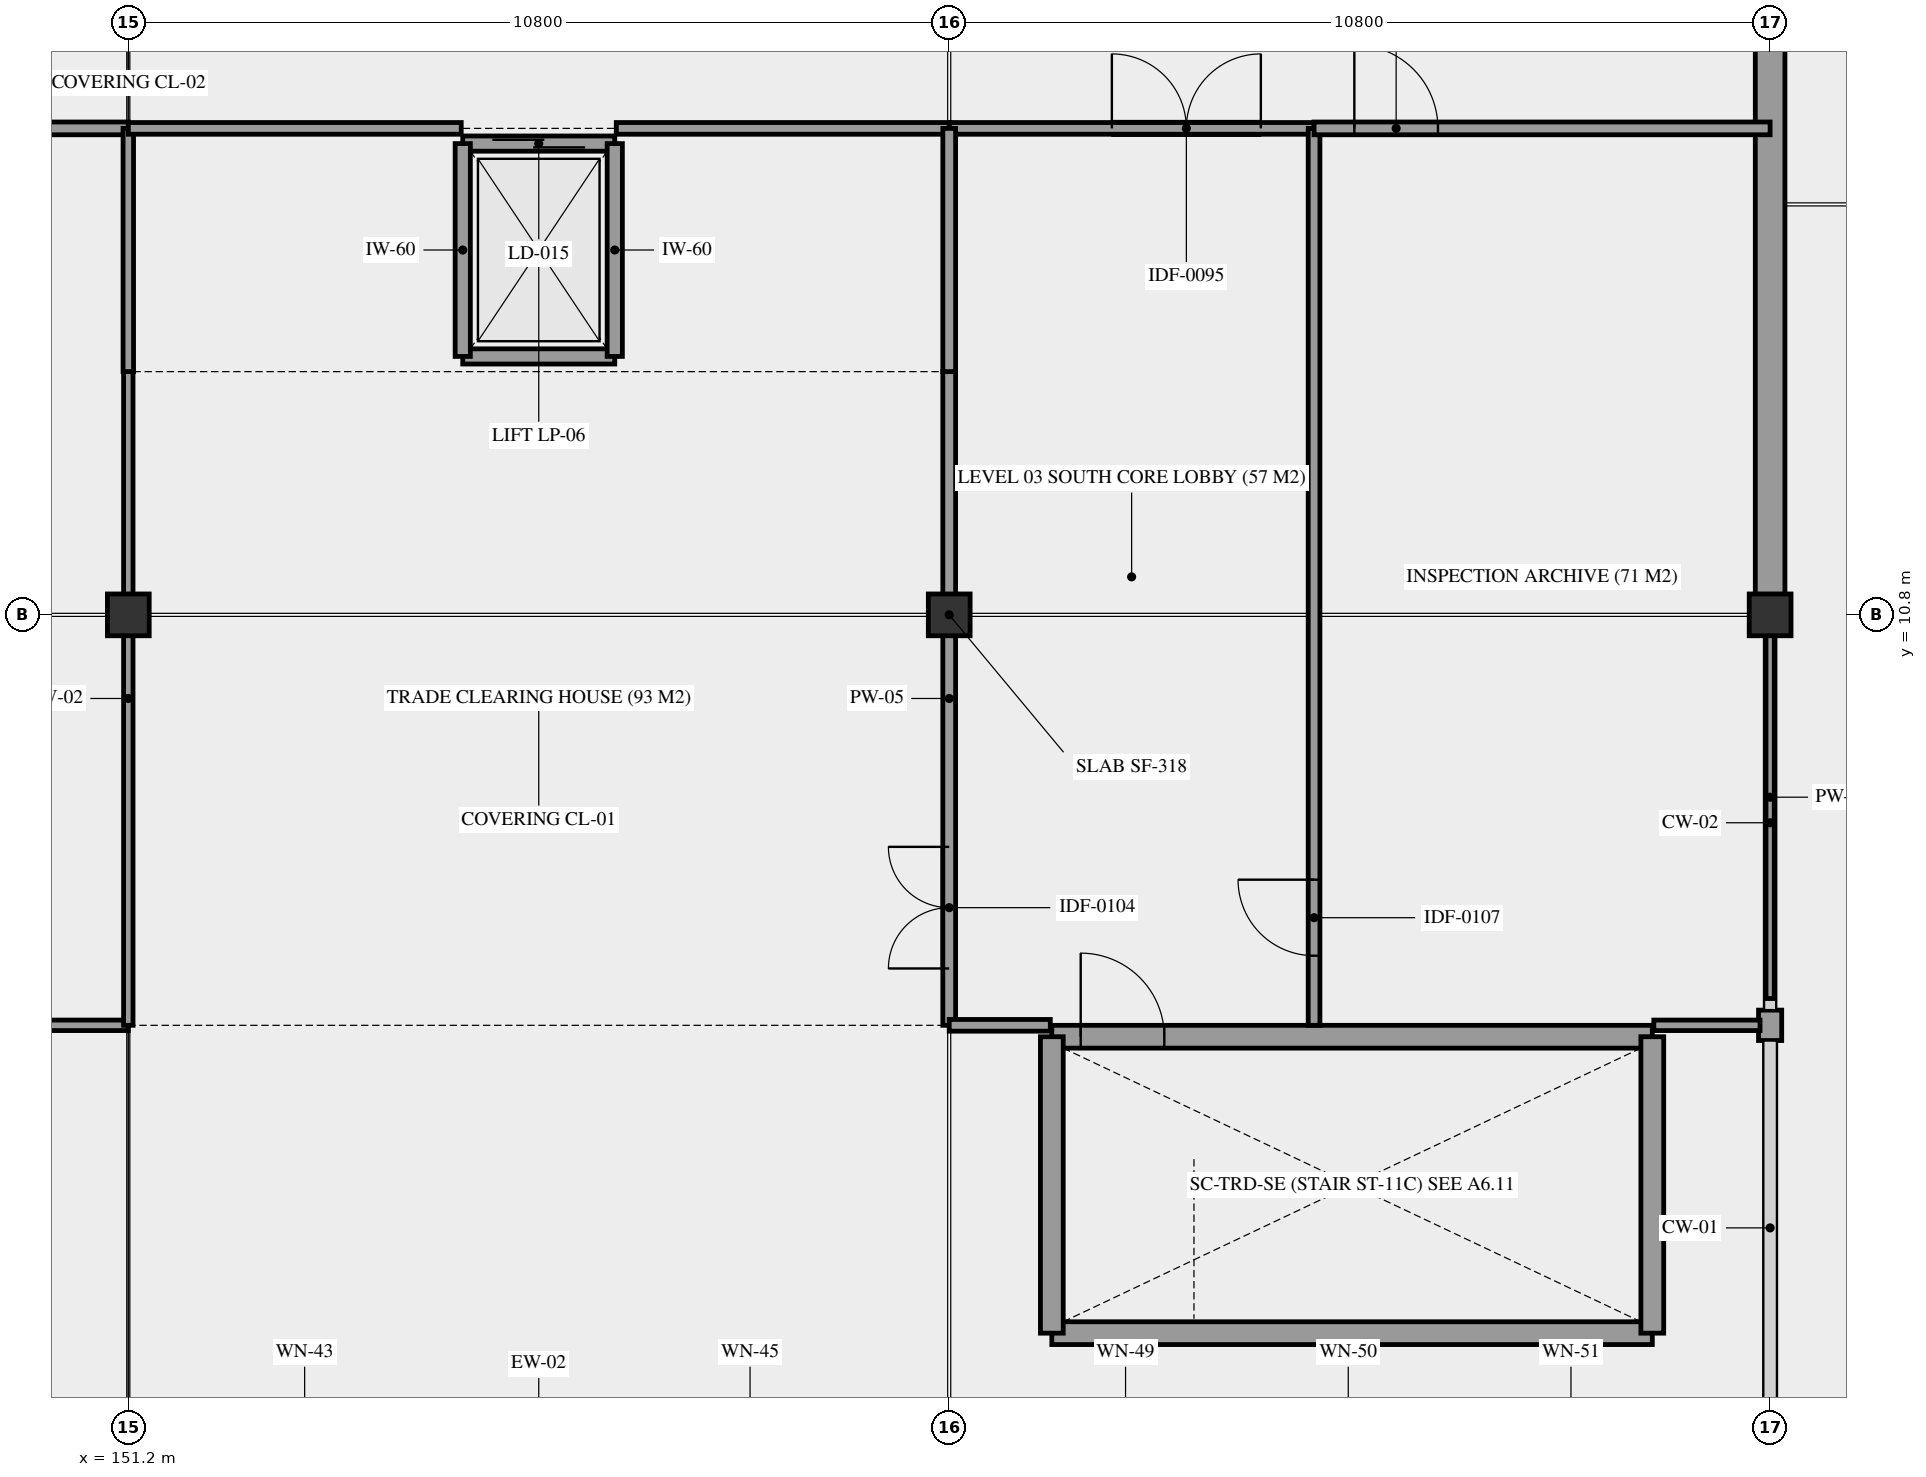
"""IFC4 building model, lengths in metres.
Left out: names, types, materials, properties, quantities, classifications, styles, units other than length and angle.
Written with IfcOpenShell. Run it as: python <this file> out.ifc"""

import sys

from ifc_helpers import new_model, si_unit, direction, frame, frame_2d, origin, origin_2d, place, context, subcontext, project, spatial, rectangle, extrude, element, fill, save


model = new_model("IFC4")
c1 = context("Model", 3, precision=1e-05, world=origin(), true_north=direction((0.0, 1.0)))
c2 = subcontext(c1, "Body", "Model", "MODEL_VIEW")
j1 = project(units=[si_unit("LENGTHUNIT", "METRE"), si_unit("PLANEANGLEUNIT", "RADIAN")], contexts=[c1])
p1 = place(None, origin())
s1 = spatial("IfcSite", under=j1, at=p1, CompositionType="ELEMENT")
p2 = place(p1, origin())
s2 = spatial("IfcBuilding", under=s1, at=p2, CompositionType="ELEMENT")
p3 = place(p2, frame((0.0, 0.0, 14.76)))
s3 = spatial("IfcBuildingStorey", under=s2, at=p3, CompositionType="ELEMENT", Elevation=14.76)
for number, where, z_axis, x_axis in (
    (1, (151.2, 10.8, 0.0), (0.0, 0.0, 1.0), (1.0, 0.0, 0.0)),
    (2, (162.0, 10.8, 0.0), (0.0, 0.0, 1.0), (1.0, 0.0, 0.0)),
    (3, (172.8, 10.8, 0.0), (0.0, 0.0, 1.0), (1.0, 0.0, 0.0)),
):
    element("IfcColumn", number, at=place(p3, frame(where, z_axis=z_axis, x_axis=x_axis)), inside=s3, PredefinedType="COLUMN", context=c2, shape_type="SweptSolid", body=[
        extrude(rectangle(XDim=0.55, YDim=0.55, at=origin_2d()), origin(), (0.0, 0.0, 1.0), 4.32),
    ])
p4 = place(p3, frame((172.8, 5.2, 0.0), z_axis=(0.0, 0.0, 1.0), x_axis=(0.0, 1.0, 0.0)))
e4 = element("IfcWall", 4, at=p4, inside=s3, PredefinedType="STANDARD", context=c2, shape_type="SweptSolid", body=[
    extrude(rectangle(XDim=0.4, YDim=0.305, at=frame_2d((0.2, 0.0))), origin(), (0.0, 0.0, 1.0), 3.17),
])
p5 = place(p3, frame((172.8, 11.07, 0.0), z_axis=(0.0, 0.0, 1.0), x_axis=(0.0, 1.0, 0.0)))
e5 = element("IfcWall", 5, at=p5, inside=s3, PredefinedType="STANDARD", context=c2, shape_type="SweptSolid", body=[
    extrude(rectangle(XDim=10.26, YDim=0.39, at=frame_2d((5.13, 0.0))), origin(), (0.0, 0.0, 1.0), 3.17),
])
p6 = place(p3, frame((163.35, 1.35, 0.0), z_axis=(0.0, 0.0, 1.0), x_axis=(1.0, 0.0, 0.0)))
e6 = element("IfcWall", 6, at=p6, inside=s3, PredefinedType="SHEAR", context=c2, shape_type="SweptSolid", body=[
    extrude(rectangle(XDim=7.9, YDim=0.3, at=frame_2d((3.95, 0.0))), origin(), (0.0, 0.0, 1.0), 4.32),
])
p7 = place(p3, frame((163.35, 5.25, 0.0), z_axis=(0.0, 0.0, 1.0), x_axis=(1.0, 0.0, 0.0)))
e7 = element("IfcWall", 7, at=p7, inside=s3, PredefinedType="SHEAR", context=c2, shape_type="SweptSolid", body=[
    extrude(rectangle(XDim=7.9, YDim=0.3, at=frame_2d((3.95, 0.0))), origin(), (0.0, 0.0, 1.0), 4.32),
])
p8 = place(p7, frame((0.38, 0.0, 0.0)))
e8 = element("IfcOpeningElement", 8, at=p8, cuts=e7, PredefinedType="OPENING", context=c2, shape_type="SweptSolid", body=[
    extrude(rectangle(XDim=1.1, YDim=2.2, at=frame_2d((0.55, 1.1))), frame((0.0, 0.16, 0.0), z_axis=(0.0, -1.0, 0.0), x_axis=(1.0, 0.0, 0.0)), (0.0, 0.0, 1.0), 0.32),
])
for number, where, z_axis, x_axis in (
    (9, (163.35, 1.35, 0.0), (0.0, 0.0, 1.0), (0.0, 1.0, 0.0)),
    (10, (171.25, 1.35, 0.0), (0.0, 0.0, 1.0), (0.0, 1.0, 0.0)),
):
    element("IfcWall", number, at=place(p3, frame(where, z_axis=z_axis, x_axis=x_axis)), inside=s3, PredefinedType="SHEAR", context=c2, shape_type="SweptSolid", body=[
        extrude(rectangle(XDim=3.9, YDim=0.3, at=frame_2d((1.95, 0.0))), origin(), (0.0, 0.0, 1.0), 4.32),
    ])
p9 = place(p3, frame((155.6, 14.2, 0.0), z_axis=(0.0, 0.0, 1.0), x_axis=(1.0, 0.0, 0.0)))
e11 = element("IfcWall", 11, at=p9, inside=s3, PredefinedType="SOLIDWALL", context=c2, shape_type="SweptSolid", body=[
    extrude(rectangle(XDim=2.0, YDim=0.2, at=frame_2d((1.0, 0.0))), origin(), (0.0, 0.0, 1.0), 3.14),
])
p10 = place(p3, frame((155.6, 17.0, 0.0), z_axis=(0.0, 0.0, 1.0), x_axis=(1.0, 0.0, 0.0)))
e12 = element("IfcWall", 12, at=p10, inside=s3, PredefinedType="SOLIDWALL", context=c2, shape_type="SweptSolid", body=[
    extrude(rectangle(XDim=2.0, YDim=0.2, at=frame_2d((1.0, 0.0))), origin(), (0.0, 0.0, 1.0), 3.14),
])
p11 = place(p10, frame((0.39, 0.0, 0.0)))
e13 = element("IfcOpeningElement", 13, at=p11, cuts=e12, PredefinedType="OPENING", context=c2, shape_type="SweptSolid", body=[
    extrude(rectangle(XDim=1.22, YDim=2.2, at=frame_2d((0.61, 1.1))), frame((0.0, 0.11, 0.0), z_axis=(0.0, -1.0, 0.0), x_axis=(1.0, 0.0, 0.0)), (0.0, 0.0, 1.0), 0.22),
])
for number, where, z_axis, x_axis in (
    (14, (155.6, 14.2, 0.0), (0.0, 0.0, 1.0), (0.0, 1.0, 0.0)),
    (15, (157.6, 14.2, 0.0), (0.0, 0.0, 1.0), (0.0, 1.0, 0.0)),
):
    element("IfcWall", number, at=place(p3, frame(where, z_axis=z_axis, x_axis=x_axis)), inside=s3, PredefinedType="SOLIDWALL", context=c2, shape_type="SweptSolid", body=[
        extrude(rectangle(XDim=2.8, YDim=0.2, at=frame_2d((1.4, 0.0))), origin(), (0.0, 0.0, 1.0), 3.14),
    ])
p12 = place(p3, frame((162.0, 17.2, 0.0), z_axis=(0.0, 0.0, 1.0), x_axis=(1.0, 0.0, 0.0)))
e16 = element("IfcWall", 16, at=p12, inside=s3, PredefinedType="PARTITIONING", context=c2, shape_type="SweptSolid", body=[
    extrude(rectangle(XDim=4.8, YDim=0.154, at=frame_2d((2.4, 0.0))), origin(), (0.0, 0.0, 1.0), 2.87),
])
p13 = place(p12, frame((2.14, 0.0, 0.0)))
e17 = element("IfcOpeningElement", 17, at=p13, cuts=e16, PredefinedType="OPENING", context=c2, shape_type="SweptSolid", body=[
    extrude(rectangle(XDim=1.96, YDim=2.3, at=frame_2d((0.98, 1.15))), frame((0.0, 0.087, 0.0), z_axis=(0.0, -1.0, 0.0), x_axis=(1.0, 0.0, 0.0)), (0.0, 0.0, 1.0), 0.174),
])
p14 = place(p3, frame((140.4, 17.2, 0.0), z_axis=(0.0, 0.0, 1.0), x_axis=(1.0, 0.0, 0.0)))
e18 = element("IfcWall", 18, at=p14, inside=s3, PredefinedType="PARTITIONING", context=c2, shape_type="SweptSolid", body=[
    extrude(rectangle(XDim=10.8, YDim=0.168, at=frame_2d((5.4, 0.0))), origin(), (0.0, 0.0, 1.0), 2.87),
])
p15 = place(p14, frame((2.15, 0.0, 0.0)))
e19 = element("IfcOpeningElement", 19, at=p15, cuts=e18, PredefinedType="OPENING", context=c2, shape_type="SweptSolid", body=[
    extrude(rectangle(XDim=1.1, YDim=2.2, at=frame_2d((0.55, 1.1))), frame((0.0, 0.094, 0.0), z_axis=(0.0, -1.0, 0.0), x_axis=(1.0, 0.0, 0.0)), (0.0, 0.0, 1.0), 0.188),
])
p16 = place(p3, frame((162.0, 5.4, 0.0), z_axis=(0.0, 0.0, 1.0), x_axis=(0.0, 1.0, 0.0)))
e20 = element("IfcWall", 20, at=p16, inside=s3, PredefinedType="PARTITIONING", context=c2, shape_type="SweptSolid", body=[
    extrude(rectangle(XDim=8.6, YDim=0.168, at=frame_2d((4.3, 0.0))), origin(), (0.0, 0.0, 1.0), 2.87),
])
p17 = place(p16, frame((0.748, 0.0, 0.0)))
e21 = element("IfcOpeningElement", 21, at=p17, cuts=e20, PredefinedType="OPENING", context=c2, shape_type="SweptSolid", body=[
    extrude(rectangle(XDim=1.6, YDim=2.2, at=frame_2d((0.8, 1.1))), frame((0.0, 0.094, 0.0), z_axis=(0.0, -1.0, 0.0), x_axis=(1.0, 0.0, 0.0)), (0.0, 0.0, 1.0), 0.188),
])
p18 = place(p3, frame((166.8, 5.4, 0.0), z_axis=(0.0, 0.0, 1.0), x_axis=(0.0, 1.0, 0.0)))
e22 = element("IfcWall", 22, at=p18, inside=s3, PredefinedType="PARTITIONING", context=c2, shape_type="SweptSolid", body=[
    extrude(rectangle(XDim=11.8, YDim=0.154, at=frame_2d((5.9, 0.0))), origin(), (0.0, 0.0, 1.0), 2.87),
])
p19 = place(p18, frame((0.916, 0.0, 0.0)))
e23 = element("IfcOpeningElement", 23, at=p19, cuts=e22, PredefinedType="OPENING", context=c2, shape_type="SweptSolid", body=[
    extrude(rectangle(XDim=1.0, YDim=2.15, at=frame_2d((0.5, 1.075))), frame((0.0, 0.087, 0.0), z_axis=(0.0, -1.0, 0.0), x_axis=(1.0, 0.0, 0.0)), (0.0, 0.0, 1.0), 0.174),
])
p20 = place(p3, frame((166.8, 17.2, 0.0), z_axis=(0.0, 0.0, 1.0), x_axis=(1.0, 0.0, 0.0)))
e24 = element("IfcWall", 24, at=p20, inside=s3, PredefinedType="PARTITIONING", context=c2, shape_type="SweptSolid", body=[
    extrude(rectangle(XDim=6.0, YDim=0.168, at=frame_2d((3.0, 0.0))), origin(), (0.0, 0.0, 1.0), 2.87),
])
p21 = place(p20, frame((0.53, 0.0, 0.0)))
e25 = element("IfcOpeningElement", 25, at=p21, cuts=e24, PredefinedType="OPENING", context=c2, shape_type="SweptSolid", body=[
    extrude(rectangle(XDim=1.1, YDim=2.2, at=frame_2d((0.55, 1.1))), frame((0.0, 0.094, 0.0), z_axis=(0.0, -1.0, 0.0), x_axis=(1.0, 0.0, 0.0)), (0.0, 0.0, 1.0), 0.188),
])
p22 = place(p3, frame((149.27, 5.4, 0.0), z_axis=(0.0, 0.0, 1.0), x_axis=(1.0, 0.0, 0.0)))
e26 = element("IfcWall", 26, at=p22, inside=s3, PredefinedType="PARTITIONING", context=c2, shape_type="SweptSolid", body=[
    extrude(rectangle(XDim=1.93, YDim=0.138, at=frame_2d((0.965, 0.0))), origin(), (0.0, 0.0, 1.0), 2.87),
])
p23 = place(p3, frame((151.2, 5.4, 0.0), z_axis=(0.0, 0.0, 1.0), x_axis=(0.0, 1.0, 0.0)))
e27 = element("IfcWall", 27, at=p23, inside=s3, PredefinedType="PARTITIONING", context=c2, shape_type="SweptSolid", body=[
    extrude(rectangle(XDim=8.6, YDim=0.124, at=frame_2d((4.3, 0.0))), origin(), (0.0, 0.0, 1.0), 2.87),
])
p24 = place(p3, frame((151.2, 14.0, 0.0), z_axis=(0.0, 0.0, 1.0), x_axis=(0.0, 1.0, 0.0)))
e28 = element("IfcWall", 28, at=p24, inside=s3, PredefinedType="PARTITIONING", context=c2, shape_type="SweptSolid", body=[
    extrude(rectangle(XDim=3.2, YDim=0.138, at=frame_2d((1.6, 0.0))), origin(), (0.0, 0.0, 1.0), 2.87),
])
p25 = place(p3, frame((151.2, 17.2, 0.0), z_axis=(0.0, 0.0, 1.0), x_axis=(1.0, 0.0, 0.0)))
e29 = element("IfcWall", 29, at=p25, inside=s3, PredefinedType="PARTITIONING", context=c2, shape_type="SweptSolid", body=[
    extrude(rectangle(XDim=4.38, YDim=0.154, at=frame_2d((2.19, 0.0))), origin(), (0.0, 0.0, 1.0), 2.87),
])
p26 = place(p3, frame((157.62, 17.2, 0.0), z_axis=(0.0, 0.0, 1.0), x_axis=(1.0, 0.0, 0.0)))
e30 = element("IfcWall", 30, at=p26, inside=s3, PredefinedType="PARTITIONING", context=c2, shape_type="SweptSolid", body=[
    extrude(rectangle(XDim=4.38, YDim=0.154, at=frame_2d((2.19, 0.0))), origin(), (0.0, 0.0, 1.0), 2.87),
])
p27 = place(p3, frame((162.0, 5.4, 0.0), z_axis=(0.0, 0.0, 1.0), x_axis=(1.0, 0.0, 0.0)))
e31 = element("IfcWall", 31, at=p27, inside=s3, PredefinedType="PARTITIONING", context=c2, shape_type="SweptSolid", body=[
    extrude(rectangle(XDim=1.33, YDim=0.154, at=frame_2d((0.665, 0.0))), origin(), (0.0, 0.0, 1.0), 2.87),
])
p28 = place(p3, frame((162.0, 14.0, 0.0), z_axis=(0.0, 0.0, 1.0), x_axis=(0.0, 1.0, 0.0)))
e32 = element("IfcWall", 32, at=p28, inside=s3, PredefinedType="PARTITIONING", context=c2, shape_type="SweptSolid", body=[
    extrude(rectangle(XDim=3.2, YDim=0.168, at=frame_2d((1.6, 0.0))), origin(), (0.0, 0.0, 1.0), 2.87),
])
p29 = place(p3, frame((171.27, 5.4, 0.0), z_axis=(0.0, 0.0, 1.0), x_axis=(1.0, 0.0, 0.0)))
e33 = element("IfcWall", 33, at=p29, inside=s3, PredefinedType="PARTITIONING", context=c2, shape_type="SweptSolid", body=[
    extrude(rectangle(XDim=1.397, YDim=0.138, at=frame_2d((0.699, 0.0))), origin(), (0.0, 0.0, 1.0), 2.87),
])
p30 = place(p3, frame((172.8, 5.752, 0.0), z_axis=(0.0, 0.0, 1.0), x_axis=(0.0, 1.0, 0.0)))
e34 = element("IfcWall", 34, at=p30, inside=s3, PredefinedType="PARTITIONING", context=c2, shape_type="SweptSolid", body=[
    extrude(rectangle(XDim=5.298, YDim=0.108, at=frame_2d((2.649, 0.0))), origin(), (0.0, 0.0, 1.0), 2.87),
])
p31 = place(p8, origin())
e35 = element("IfcDoor", 35, at=p31, inside=s3, OperationType="SINGLE_SWING_LEFT", PredefinedType="DOOR", context=c2, shape_type="SweptSolid", body=[
    extrude(rectangle(XDim=1.1, YDim=2.2, at=frame_2d((0.55, 1.1))), frame((0.0, 0.025, 0.0), z_axis=(0.0, -1.0, 0.0), x_axis=(1.0, 0.0, 0.0)), (0.0, 0.0, 1.0), 0.05),
])
fill(e8, e35)
p32 = place(p11, origin())
e36 = element("IfcDoor", 36, at=p32, inside=s3, OperationType="DOUBLE_DOOR_SLIDING", PredefinedType="DOOR", context=c2, shape_type="SweptSolid", body=[
    extrude(rectangle(XDim=1.22, YDim=2.2, at=frame_2d((0.61, 1.1))), frame((0.0, 0.025, 0.0), z_axis=(0.0, -1.0, 0.0), x_axis=(1.0, 0.0, 0.0)), (0.0, 0.0, 1.0), 0.05),
])
fill(e13, e36)
p33 = place(p13, origin())
e37 = element("IfcDoor", 37, at=p33, inside=s3, OperationType="DOUBLE_DOOR_SINGLE_SWING", PredefinedType="DOOR", context=c2, shape_type="SweptSolid", body=[
    extrude(rectangle(XDim=1.96, YDim=2.3, at=frame_2d((0.98, 1.15))), frame((0.0, 0.025, 0.0), z_axis=(0.0, -1.0, 0.0), x_axis=(1.0, 0.0, 0.0)), (0.0, 0.0, 1.0), 0.05),
])
fill(e17, e37)
p34 = place(p17, origin())
e38 = element("IfcDoor", 38, at=p34, inside=s3, OperationType="DOUBLE_DOOR_SINGLE_SWING", PredefinedType="DOOR", context=c2, shape_type="SweptSolid", body=[
    extrude(rectangle(XDim=1.6, YDim=2.2, at=frame_2d((0.8, 1.1))), frame((0.0, 0.025, 0.0), z_axis=(0.0, -1.0, 0.0), x_axis=(1.0, 0.0, 0.0)), (0.0, 0.0, 1.0), 0.05),
])
fill(e21, e38)
p35 = place(p19, origin())
e39 = element("IfcDoor", 39, at=p35, inside=s3, OperationType="SINGLE_SWING_RIGHT", PredefinedType="DOOR", context=c2, shape_type="SweptSolid", body=[
    extrude(rectangle(XDim=1.0, YDim=2.15, at=frame_2d((0.5, 1.075))), frame((0.0, 0.025, 0.0), z_axis=(0.0, -1.0, 0.0), x_axis=(1.0, 0.0, 0.0)), (0.0, 0.0, 1.0), 0.05),
])
fill(e23, e39)
p36 = place(p21, frame((1.1, 0.0, 0.0), z_axis=(0.0, 0.0, 1.0), x_axis=(-1.0, 0.0, 0.0)))
e40 = element("IfcDoor", 40, at=p36, inside=s3, OperationType="SINGLE_SWING_LEFT", PredefinedType="DOOR", context=c2, shape_type="SweptSolid", body=[
    extrude(rectangle(XDim=1.1, YDim=2.2, at=frame_2d((0.55, 1.1))), frame((0.0, 0.025, 0.0), z_axis=(0.0, -1.0, 0.0), x_axis=(1.0, 0.0, 0.0)), (0.0, 0.0, 1.0), 0.05),
])
fill(e25, e40)
save(model, sys.argv[1])
